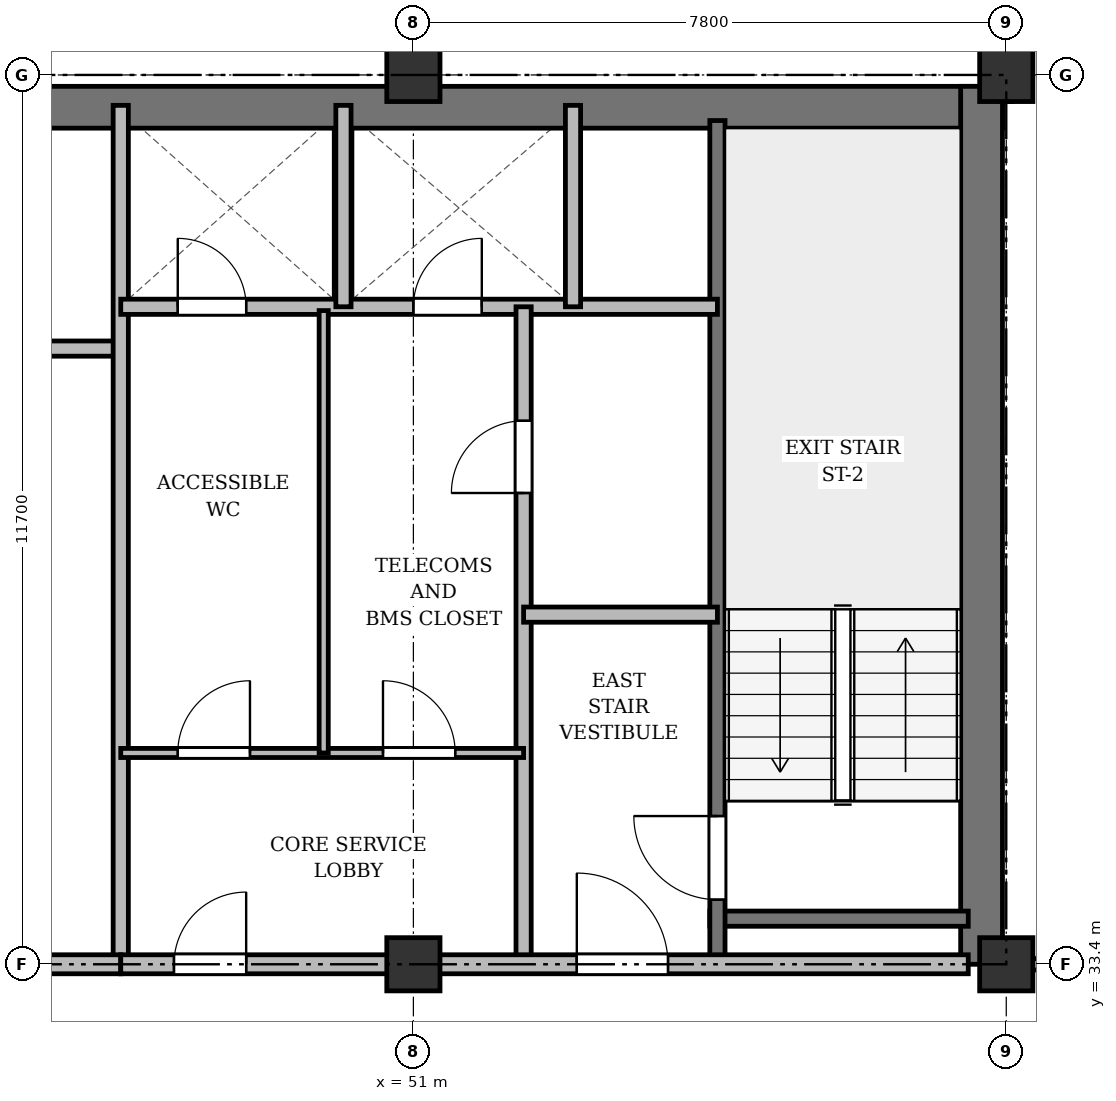
"""IFC4 building model, lengths in metres.
Left out: names, types, materials, properties, quantities, classifications, styles, units other than length and angle.
Written with IfcOpenShell. Run it as: python <this file> out.ifc"""

import sys

from ifc_helpers import new_model, si_unit, direction, frame, frame_2d, origin, origin_2d, place, context, subcontext, project, spatial, rectangle, extrude, source, transform, mapped, element, fill, save


model = new_model("IFC4")
c1 = context("Model", 3, precision=1e-05, world=origin(), true_north=direction((0.0, 1.0)))
c2 = subcontext(c1, "Body", "Model", "MODEL_VIEW")
j1 = project(units=[si_unit("LENGTHUNIT", "METRE"), si_unit("PLANEANGLEUNIT", "RADIAN")], contexts=[c1])
p1 = place(None, origin())
s1 = spatial("IfcSite", under=j1, at=p1, CompositionType="ELEMENT")
p2 = place(p1, origin())
s2 = spatial("IfcBuilding", under=s1, at=p2, CompositionType="ELEMENT")
p3 = place(p2, frame((0.0, 0.0, 142.9)))
s3 = spatial("IfcBuildingStorey", under=s2, at=p3, CompositionType="ELEMENT", Elevation=142.9)
m1 = source(origin(), c2, "Body", "SweptSolid", [
    extrude(rectangle(XDim=0.7, YDim=0.7, at=origin_2d()), origin(), (0.0, 0.0, 1.0), 3.6),
])
for number, where, z_axis, x_axis in (
    (1, (51.0, 33.4, 0.0), (0.0, 0.0, 1.0), (1.0, 0.0, 0.0)),
    (2, (51.0, 45.1, 0.0), (0.0, 0.0, 1.0), (1.0, 0.0, 0.0)),
    (3, (58.8, 33.4, 0.0), (0.0, 0.0, 1.0), (1.0, 0.0, 0.0)),
    (4, (58.8, 45.1, 0.0), (0.0, 0.0, 1.0), (1.0, 0.0, 0.0)),
):
    element("IfcColumn", number, at=place(p3, frame(where, z_axis=z_axis, x_axis=x_axis)), inside=s3, PredefinedType="COLUMN", context=c2, shape_type="MappedRepresentation", body=[
        mapped(m1, transform((0.0, 0.0, 0.0), x_axis=(1.0, 0.0, 0.0), y_axis=(0.0, 1.0, 0.0), z_axis=(0.0, 0.0, 1.0), scale=1.0)),
    ])
p4 = place(p3, frame((15.65, 44.675, 0.0), z_axis=(0.0, 0.0, 1.0), x_axis=(1.0, 0.0, 0.0)))
e5 = element("IfcWall", 5, at=p4, inside=s3, PredefinedType="SHEAR", context=c2, shape_type="SweptSolid", body=[
    extrude(rectangle(XDim=43.1, YDim=0.55, at=frame_2d((21.55, 0.0))), origin(), (0.0, 0.0, 1.0), 3.35),
])
p5 = place(p3, frame((58.475, 33.4, 0.0), z_axis=(0.0, 0.0, 1.0), x_axis=(0.0, 1.0, 0.0)))
e6 = element("IfcWall", 6, at=p5, inside=s3, PredefinedType="SHEAR", context=c2, shape_type="SweptSolid", body=[
    extrude(rectangle(XDim=11.55, YDim=0.55, at=frame_2d((5.775, 0.0))), origin(), (0.0, 0.0, 1.0), 3.35),
])
p6 = place(p3, frame((54.9, 34.0, 0.0), z_axis=(0.0, 0.0, 1.0), x_axis=(1.0, 0.0, 0.0)))
e7 = element("IfcWall", 7, at=p6, inside=s3, PredefinedType="SHEAR", context=c2, shape_type="SweptSolid", body=[
    extrude(rectangle(XDim=3.4, YDim=0.2, at=frame_2d((1.7, 0.0))), origin(), (0.0, 0.0, 1.0), 3.35),
])
p7 = place(p3, frame((55.0, 33.4, 0.0), z_axis=(0.0, 0.0, 1.0), x_axis=(0.0, 1.0, 0.0)))
e8 = element("IfcWall", 8, at=p7, inside=s3, PredefinedType="SHEAR", context=c2, shape_type="SweptSolid", body=[
    extrude(rectangle(XDim=11.1, YDim=0.2, at=frame_2d((5.55, 0.0))), origin(), (0.0, 0.0, 1.0), 3.35),
])
p8 = place(p7, frame((0.85, 0.0, 0.0)))
e9 = element("IfcOpeningElement", 9, at=p8, cuts=e8, PredefinedType="OPENING", context=c2, shape_type="SweptSolid", body=[
    extrude(rectangle(XDim=1.1, YDim=2.15, at=frame_2d((0.55, 1.075))), frame((0.0, 0.11, 0.0), z_axis=(0.0, -1.0, 0.0), x_axis=(1.0, 0.0, 0.0)), (0.0, 0.0, 1.0), 0.22),
])
p9 = place(p3, frame((40.25, 41.5, 0.0), z_axis=(0.0, 0.0, 1.0), x_axis=(1.0, 0.0, 0.0)))
e10 = element("IfcWall", 10, at=p9, inside=s3, PredefinedType="SOLIDWALL", context=c2, shape_type="SweptSolid", body=[
    extrude(rectangle(XDim=6.9, YDim=0.2, at=frame_2d((3.45, 0.0))), origin(), (0.0, 0.0, 1.0), 2.85),
])
p10 = place(p3, frame((47.15, 33.4, 0.0), z_axis=(0.0, 0.0, 1.0), x_axis=(0.0, 1.0, 0.0)))
e11 = element("IfcWall", 11, at=p10, inside=s3, PredefinedType="SOLIDWALL", context=c2, shape_type="SweptSolid", body=[
    extrude(rectangle(XDim=11.3, YDim=0.2, at=frame_2d((5.65, 0.0))), origin(), (0.0, 0.0, 1.0), 2.75),
])
p11 = place(p3, frame((33.3, 33.4, 0.0), z_axis=(0.0, 0.0, 1.0), x_axis=(1.0, 0.0, 0.0)))
e12 = element("IfcWall", 12, at=p11, inside=s3, PredefinedType="PARTITIONING", context=c2, shape_type="SweptSolid", body=[
    extrude(rectangle(XDim=13.85, YDim=0.25, at=frame_2d((6.925, 0.0))), origin(), (0.0, 0.0, 1.0), 2.75),
])
p12 = place(p11, frame((4.2, 0.0, 0.0)))
e13 = element("IfcOpeningElement", 13, at=p12, cuts=e12, PredefinedType="OPENING", context=c2, shape_type="SweptSolid", body=[
    extrude(rectangle(XDim=1.6, YDim=2.2, at=frame_2d((0.8, 1.1))), frame((0.0, 0.135, 0.0), z_axis=(0.0, -1.0, 0.0), x_axis=(1.0, 0.0, 0.0)), (0.0, 0.0, 1.0), 0.27),
])
p13 = place(p3, frame((47.15, 42.05, 0.0), z_axis=(0.0, 0.0, 1.0), x_axis=(1.0, 0.0, 0.0)))
e14 = element("IfcWall", 14, at=p13, inside=s3, PredefinedType="SOLIDWALL", context=c2, shape_type="SweptSolid", body=[
    extrude(rectangle(XDim=7.85, YDim=0.2, at=frame_2d((3.925, 0.0))), origin(), (0.0, 0.0, 1.0), 2.85),
])
p14 = place(p13, frame((0.75, 0.0, 0.0)))
e15 = element("IfcOpeningElement", 15, at=p14, cuts=e14, PredefinedType="OPENING", context=c2, shape_type="SweptSolid", body=[
    extrude(rectangle(XDim=0.9, YDim=2.1, at=frame_2d((0.45, 1.05))), frame((0.0, 0.11, 0.0), z_axis=(0.0, -1.0, 0.0), x_axis=(1.0, 0.0, 0.0)), (0.0, 0.0, 1.0), 0.22),
])
p15 = place(p13, frame((3.85, 0.0, 0.0)))
e16 = element("IfcOpeningElement", 16, at=p15, cuts=e14, PredefinedType="OPENING", context=c2, shape_type="SweptSolid", body=[
    extrude(rectangle(XDim=0.9, YDim=2.1, at=frame_2d((0.45, 1.05))), frame((0.0, 0.11, 0.0), z_axis=(0.0, -1.0, 0.0), x_axis=(1.0, 0.0, 0.0)), (0.0, 0.0, 1.0), 0.22),
])
for number, where, z_axis, x_axis in (
    (17, (50.08, 42.05, 0.0), (0.0, 0.0, 1.0), (0.0, 1.0, 0.0)),
    (18, (53.1, 42.05, 0.0), (0.0, 0.0, 1.0), (0.0, 1.0, 0.0)),
):
    element("IfcWall", number, at=place(p3, frame(where, z_axis=z_axis, x_axis=x_axis)), inside=s3, PredefinedType="SOLIDWALL", context=c2, shape_type="SweptSolid", body=[
        extrude(rectangle(XDim=2.65, YDim=0.2, at=frame_2d((1.325, 0.0))), origin(), (0.0, 0.0, 1.0), 3.35),
    ])
p16 = place(p3, frame((52.45, 33.4, 0.0), z_axis=(0.0, 0.0, 1.0), x_axis=(0.0, 1.0, 0.0)))
e19 = element("IfcWall", 19, at=p16, inside=s3, PredefinedType="PARTITIONING", context=c2, shape_type="SweptSolid", body=[
    extrude(rectangle(XDim=8.65, YDim=0.2, at=frame_2d((4.325, 0.0))), origin(), (0.0, 0.0, 1.0), 2.75),
])
p17 = place(p16, frame((6.2, 0.0, 0.0)))
e20 = element("IfcOpeningElement", 20, at=p17, cuts=e19, PredefinedType="OPENING", context=c2, shape_type="SweptSolid", body=[
    extrude(rectangle(XDim=0.95, YDim=2.15, at=frame_2d((0.475, 1.075))), frame((0.0, 0.11, 0.0), z_axis=(0.0, -1.0, 0.0), x_axis=(1.0, 0.0, 0.0)), (0.0, 0.0, 1.0), 0.22),
])
p18 = place(p3, frame((52.45, 38.0, 0.0), z_axis=(0.0, 0.0, 1.0), x_axis=(1.0, 0.0, 0.0)))
e21 = element("IfcWall", 21, at=p18, inside=s3, PredefinedType="PARTITIONING", context=c2, shape_type="SweptSolid", body=[
    extrude(rectangle(XDim=2.55, YDim=0.2, at=frame_2d((1.275, 0.0))), origin(), (0.0, 0.0, 1.0), 3.35),
])
p19 = place(p3, frame((47.15, 36.18, 0.0), z_axis=(0.0, 0.0, 1.0), x_axis=(1.0, 0.0, 0.0)))
e22 = element("IfcWall", 22, at=p19, inside=s3, PredefinedType="PARTITIONING", context=c2, shape_type="SweptSolid", body=[
    extrude(rectangle(XDim=5.3, YDim=0.12, at=frame_2d((2.65, 0.0))), origin(), (0.0, 0.0, 1.0), 2.85),
])
p20 = place(p19, frame((0.75, 0.0, 0.0)))
e23 = element("IfcOpeningElement", 23, at=p20, cuts=e22, PredefinedType="OPENING", context=c2, shape_type="SweptSolid", body=[
    extrude(rectangle(XDim=0.95, YDim=2.15, at=frame_2d((0.475, 1.075))), frame((0.0, 0.07, 0.0), z_axis=(0.0, -1.0, 0.0), x_axis=(1.0, 0.0, 0.0)), (0.0, 0.0, 1.0), 0.14),
])
p21 = place(p19, frame((3.45, 0.0, 0.0)))
e24 = element("IfcOpeningElement", 24, at=p21, cuts=e22, PredefinedType="OPENING", context=c2, shape_type="SweptSolid", body=[
    extrude(rectangle(XDim=0.95, YDim=2.15, at=frame_2d((0.475, 1.075))), frame((0.0, 0.07, 0.0), z_axis=(0.0, -1.0, 0.0), x_axis=(1.0, 0.0, 0.0)), (0.0, 0.0, 1.0), 0.14),
])
p22 = place(p3, frame((49.82, 36.18, 0.0), z_axis=(0.0, 0.0, 1.0), x_axis=(0.0, 1.0, 0.0)))
e25 = element("IfcWall", 25, at=p22, inside=s3, PredefinedType="PARTITIONING", context=c2, shape_type="SweptSolid", body=[
    extrude(rectangle(XDim=5.82, YDim=0.12, at=frame_2d((2.91, 0.0))), origin(), (0.0, 0.0, 1.0), 3.35),
])
p23 = place(p3, frame((47.15, 33.4, 0.0), z_axis=(0.0, 0.0, 1.0), x_axis=(1.0, 0.0, 0.0)))
e26 = element("IfcWall", 26, at=p23, inside=s3, PredefinedType="PARTITIONING", context=c2, shape_type="SweptSolid", body=[
    extrude(rectangle(XDim=11.15, YDim=0.25, at=frame_2d((5.575, 0.0))), origin(), (0.0, 0.0, 1.0), 2.75),
])
p24 = place(p23, frame((0.7, 0.0, 0.0)))
e27 = element("IfcOpeningElement", 27, at=p24, cuts=e26, PredefinedType="OPENING", context=c2, shape_type="SweptSolid", body=[
    extrude(rectangle(XDim=0.95, YDim=2.15, at=frame_2d((0.475, 1.075))), frame((0.0, 0.135, 0.0), z_axis=(0.0, -1.0, 0.0), x_axis=(1.0, 0.0, 0.0)), (0.0, 0.0, 1.0), 0.27),
])
p25 = place(p23, frame((6.0, 0.0, 0.0)))
e28 = element("IfcOpeningElement", 28, at=p25, cuts=e26, PredefinedType="OPENING", context=c2, shape_type="SweptSolid", body=[
    extrude(rectangle(XDim=1.2, YDim=2.15, at=frame_2d((0.6, 1.075))), frame((0.0, 0.135, 0.0), z_axis=(0.0, -1.0, 0.0), x_axis=(1.0, 0.0, 0.0)), (0.0, 0.0, 1.0), 0.27),
])
p26 = place(p3, frame((58.8, 33.4, 0.0), z_axis=(0.0, 0.0, 1.0), x_axis=(1.0, 0.0, 0.0)))
e29 = element("IfcWall", 29, at=p26, inside=s3, PredefinedType="PARTITIONING", context=c2, shape_type="SweptSolid", body=[
    extrude(rectangle(XDim=7.55, YDim=0.15, at=frame_2d((3.775, 0.0))), origin(), (0.0, 0.0, 1.0), 2.75),
])
p27 = place(p26, frame((3.2, 0.0, 0.0)))
e30 = element("IfcOpeningElement", 30, at=p27, cuts=e29, PredefinedType="OPENING", context=c2, shape_type="SweptSolid", body=[
    extrude(rectangle(XDim=0.95, YDim=2.15, at=frame_2d((0.475, 1.075))), frame((0.0, 0.085, 0.0), z_axis=(0.0, -1.0, 0.0), x_axis=(1.0, 0.0, 0.0)), (0.0, 0.0, 1.0), 0.17),
])
p28 = place(p3, frame((58.8, 44.75, 0.0), z_axis=(0.0, 0.0, 1.0), x_axis=(0.0, 1.0, 0.0)))
e31 = element("IfcWall", 31, at=p28, inside=s3, PredefinedType="PARTITIONING", context=c2, shape_type="SweptSolid", body=[
    extrude(rectangle(XDim=3.61, YDim=0.15, at=frame_2d((1.805, 0.0))), origin(), (0.0, 0.0, 1.0), 2.85),
])
p29 = place(p28, frame((1.1, 0.0, 0.0)))
e32 = element("IfcOpeningElement", 32, at=p29, cuts=e31, PredefinedType="OPENING", context=c2, shape_type="SweptSolid", body=[
    extrude(rectangle(XDim=0.95, YDim=2.15, at=frame_2d((0.475, 1.075))), frame((0.0, 0.085, 0.0), z_axis=(0.0, -1.0, 0.0), x_axis=(1.0, 0.0, 0.0)), (0.0, 0.0, 1.0), 0.17),
])
m2 = source(origin(), c2, "Body", "SweptSolid", [
    extrude(rectangle(XDim=1.1, YDim=2.15, at=frame_2d((0.55, 1.075))), frame((0.0, 0.025, 0.0), z_axis=(0.0, -1.0, 0.0), x_axis=(1.0, 0.0, 0.0)), (0.0, 0.0, 1.0), 0.05),
])
p30 = place(p8, origin())
e33 = element("IfcDoor", 33, at=p30, inside=s3, OperationType="SINGLE_SWING_RIGHT", PredefinedType="DOOR", context=c2, shape_type="MappedRepresentation", body=[
    mapped(m2, transform((0.0, 0.0, 0.0), x_axis=(1.0, 0.0, 0.0), y_axis=(0.0, 1.0, 0.0), z_axis=(0.0, 0.0, 1.0), scale=1.0)),
])
fill(e9, e33)
m3 = source(origin(), c2, "Body", "SweptSolid", [
    extrude(rectangle(XDim=0.9, YDim=2.1, at=frame_2d((0.45, 1.05))), frame((0.0, 0.025, 0.0), z_axis=(0.0, -1.0, 0.0), x_axis=(1.0, 0.0, 0.0)), (0.0, 0.0, 1.0), 0.05),
])
p31 = place(p14, origin())
e34 = element("IfcDoor", 34, at=p31, inside=s3, OperationType="SINGLE_SWING_LEFT", PredefinedType="DOOR", context=c2, shape_type="MappedRepresentation", body=[
    mapped(m3, transform((0.0, 0.0, 0.0), x_axis=(1.0, 0.0, 0.0), y_axis=(0.0, 1.0, 0.0), z_axis=(0.0, 0.0, 1.0), scale=1.0)),
])
fill(e15, e34)
p32 = place(p15, origin())
e35 = element("IfcDoor", 35, at=p32, inside=s3, OperationType="SINGLE_SWING_RIGHT", PredefinedType="DOOR", context=c2, shape_type="MappedRepresentation", body=[
    mapped(m3, transform((0.0, 0.0, 0.0), x_axis=(1.0, 0.0, 0.0), y_axis=(0.0, 1.0, 0.0), z_axis=(0.0, 0.0, 1.0), scale=1.0)),
])
fill(e16, e35)
m4 = source(origin(), c2, "Body", "SweptSolid", [
    extrude(rectangle(XDim=0.95, YDim=2.15, at=frame_2d((0.475, 1.075))), frame((0.0, 0.025, 0.0), z_axis=(0.0, -1.0, 0.0), x_axis=(1.0, 0.0, 0.0)), (0.0, 0.0, 1.0), 0.05),
])
p33 = place(p17, origin())
e36 = element("IfcDoor", 36, at=p33, inside=s3, OperationType="SINGLE_SWING_LEFT", PredefinedType="DOOR", context=c2, shape_type="MappedRepresentation", body=[
    mapped(m4, transform((0.0, 0.0, 0.0), x_axis=(1.0, 0.0, 0.0), y_axis=(0.0, 1.0, 0.0), z_axis=(0.0, 0.0, 1.0), scale=1.0)),
])
fill(e20, e36)
p34 = place(p20, origin())
e37 = element("IfcDoor", 37, at=p34, inside=s3, OperationType="SINGLE_SWING_RIGHT", PredefinedType="DOOR", context=c2, shape_type="MappedRepresentation", body=[
    mapped(m4, transform((0.0, 0.0, 0.0), x_axis=(1.0, 0.0, 0.0), y_axis=(0.0, 1.0, 0.0), z_axis=(0.0, 0.0, 1.0), scale=1.0)),
])
fill(e23, e37)
p35 = place(p21, origin())
e38 = element("IfcDoor", 38, at=p35, inside=s3, OperationType="SINGLE_SWING_LEFT", PredefinedType="DOOR", context=c2, shape_type="MappedRepresentation", body=[
    mapped(m4, transform((0.0, 0.0, 0.0), x_axis=(1.0, 0.0, 0.0), y_axis=(0.0, 1.0, 0.0), z_axis=(0.0, 0.0, 1.0), scale=1.0)),
])
fill(e24, e38)
p36 = place(p24, origin())
e39 = element("IfcDoor", 39, at=p36, inside=s3, OperationType="SINGLE_SWING_RIGHT", PredefinedType="DOOR", context=c2, shape_type="MappedRepresentation", body=[
    mapped(m4, transform((0.0, 0.0, 0.0), x_axis=(1.0, 0.0, 0.0), y_axis=(0.0, 1.0, 0.0), z_axis=(0.0, 0.0, 1.0), scale=1.0)),
])
fill(e27, e39)
m5 = source(origin(), c2, "Body", "SweptSolid", [
    extrude(rectangle(XDim=1.2, YDim=2.15, at=frame_2d((0.6, 1.075))), frame((0.0, 0.025, 0.0), z_axis=(0.0, -1.0, 0.0), x_axis=(1.0, 0.0, 0.0)), (0.0, 0.0, 1.0), 0.05),
])
p37 = place(p25, origin())
e40 = element("IfcDoor", 40, at=p37, inside=s3, OperationType="SINGLE_SWING_LEFT", PredefinedType="DOOR", context=c2, shape_type="MappedRepresentation", body=[
    mapped(m5, transform((0.0, 0.0, 0.0), x_axis=(1.0, 0.0, 0.0), y_axis=(0.0, 1.0, 0.0), z_axis=(0.0, 0.0, 1.0), scale=1.0)),
])
fill(e28, e40)
save(model, sys.argv[1])
